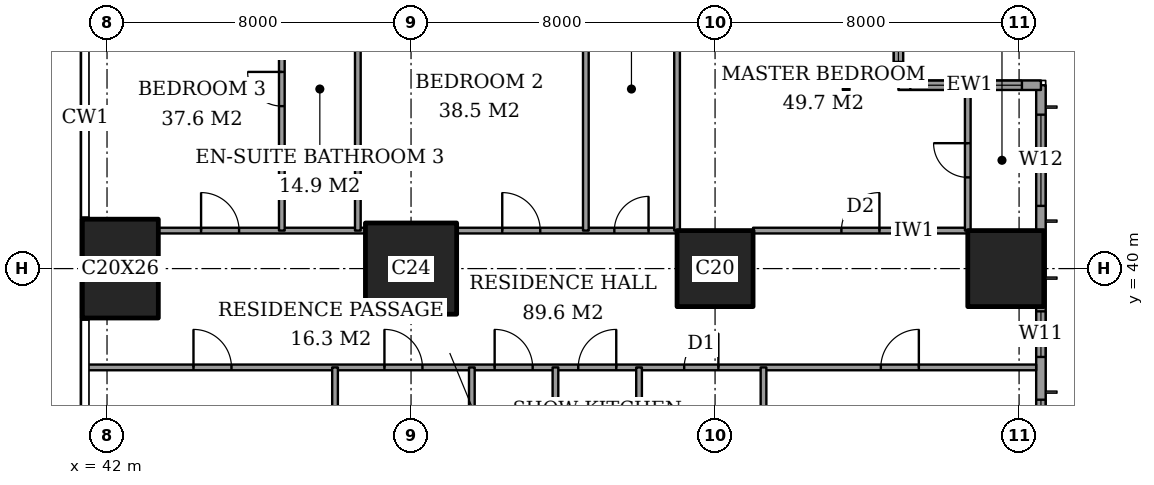
"""IFC4 building model, lengths in metres.
Left out: names, types, materials, properties, quantities, classifications, styles, units other than length and angle.
Written with IfcOpenShell. Run it as: python <this file> out.ifc"""

import sys

from ifc_helpers import new_model, si_unit, direction, frame, frame_2d, origin, origin_2d, place, context, subcontext, project, spatial, rectangle, extrude, element, fill, save


model = new_model("IFC4")
c1 = context("Model", 3, precision=1e-05, world=origin(), true_north=direction((0.0, 1.0)))
c2 = subcontext(c1, "Body", "Model", "MODEL_VIEW")
j1 = project(units=[si_unit("LENGTHUNIT", "METRE"), si_unit("PLANEANGLEUNIT", "RADIAN")], contexts=[c1])
p1 = place(None, origin())
s1 = spatial("IfcSite", under=j1, at=p1, CompositionType="ELEMENT")
p2 = place(p1, origin())
s2 = spatial("IfcBuilding", under=s1, at=p2, CompositionType="ELEMENT")
p3 = place(p2, frame((0.0, 0.0, 114.2)))
s3 = spatial("IfcBuildingStorey", under=s2, at=p3, CompositionType="ELEMENT", Elevation=114.2)
p4 = place(p3, frame((42.35, 40.0, 0.0), z_axis=(0.0, 0.0, 1.0), x_axis=(1.0, 0.0, 0.0)))
e1 = element("IfcColumn", 1, at=p4, inside=s3, PredefinedType="COLUMN", context=c2, shape_type="SweptSolid", body=[
    extrude(rectangle(XDim=2.0, YDim=2.6, at=origin_2d()), origin(), (0.0, 0.0, 1.0), 3.6),
])
p5 = place(p3, frame((50.0, 40.0, 0.0), z_axis=(0.0, 0.0, 1.0), x_axis=(1.0, 0.0, 0.0)))
e2 = element("IfcColumn", 2, at=p5, inside=s3, PredefinedType="COLUMN", context=c2, shape_type="SweptSolid", body=[
    extrude(rectangle(XDim=2.4, YDim=2.4, at=origin_2d()), origin(), (0.0, 0.0, 1.0), 3.6),
])
for number, where, z_axis, x_axis in (
    (3, (58.0, 40.0, 0.0), (0.0, 0.0, 1.0), (1.0, 0.0, 0.0)),
    (4, (65.65, 40.0, 0.0), (0.0, 0.0, 1.0), (1.0, 0.0, 0.0)),
):
    element("IfcColumn", number, at=place(p3, frame(where, z_axis=z_axis, x_axis=x_axis)), inside=s3, PredefinedType="COLUMN", context=c2, shape_type="SweptSolid", body=[
        extrude(rectangle(XDim=2.0, YDim=2.0, at=origin_2d()), origin(), (0.0, 0.0, 1.0), 3.6),
    ])
p6 = place(p3, frame((66.575, 3.175, 0.0), z_axis=(0.0, 0.0, 1.0), x_axis=(0.0, 1.0, 0.0)))
e5 = element("IfcWall", 5, at=p6, inside=s3, PredefinedType="SOLIDWALL", context=c2, shape_type="SweptSolid", body=[
    extrude(rectangle(XDim=41.65, YDim=0.25, at=frame_2d((20.825, 0.0))), origin(), (0.0, 0.0, 1.0), 3.6),
])
p7 = place(p6, frame((0.775, 0.0, 0.4)))
e6 = element("IfcOpeningElement", 6, at=p7, cuts=e5, PredefinedType="OPENING", context=c2, shape_type="SweptSolid", body=[
    extrude(rectangle(XDim=2.4, YDim=2.2, at=frame_2d((1.2, 1.1))), frame((0.0, 0.135, 0.0), z_axis=(0.0, -1.0, 0.0), x_axis=(1.0, 0.0, 0.0)), (0.0, 0.0, 1.0), 0.27),
])
p8 = place(p6, frame((6.1, 0.0, 0.4)))
e7 = element("IfcOpeningElement", 7, at=p8, cuts=e5, PredefinedType="OPENING", context=c2, shape_type="SweptSolid", body=[
    extrude(rectangle(XDim=1.2, YDim=2.2, at=frame_2d((0.6, 1.1))), frame((0.0, 0.135, 0.0), z_axis=(0.0, -1.0, 0.0), x_axis=(1.0, 0.0, 0.0)), (0.0, 0.0, 1.0), 0.27),
])
p9 = place(p6, frame((8.275, 0.0, 0.4)))
e8 = element("IfcOpeningElement", 8, at=p9, cuts=e5, PredefinedType="OPENING", context=c2, shape_type="SweptSolid", body=[
    extrude(rectangle(XDim=2.4, YDim=2.2, at=frame_2d((1.2, 1.1))), frame((0.0, 0.135, 0.0), z_axis=(0.0, -1.0, 0.0), x_axis=(1.0, 0.0, 0.0)), (0.0, 0.0, 1.0), 0.27),
])
p10 = place(p6, frame((15.775, 0.0, 0.4)))
e9 = element("IfcOpeningElement", 9, at=p10, cuts=e5, PredefinedType="OPENING", context=c2, shape_type="SweptSolid", body=[
    extrude(rectangle(XDim=2.4, YDim=2.2, at=frame_2d((1.2, 1.1))), frame((0.0, 0.135, 0.0), z_axis=(0.0, -1.0, 0.0), x_axis=(1.0, 0.0, 0.0)), (0.0, 0.0, 1.0), 0.27),
])
p11 = place(p6, frame((23.475, 0.0, 0.4)))
e10 = element("IfcOpeningElement", 10, at=p11, cuts=e5, PredefinedType="OPENING", context=c2, shape_type="SweptSolid", body=[
    extrude(rectangle(XDim=2.4, YDim=2.2, at=frame_2d((1.2, 1.1))), frame((0.0, 0.135, 0.0), z_axis=(0.0, -1.0, 0.0), x_axis=(1.0, 0.0, 0.0)), (0.0, 0.0, 1.0), 0.27),
])
p12 = place(p6, frame((30.975, 0.0, 0.4)))
e11 = element("IfcOpeningElement", 11, at=p12, cuts=e5, PredefinedType="OPENING", context=c2, shape_type="SweptSolid", body=[
    extrude(rectangle(XDim=2.4, YDim=2.2, at=frame_2d((1.2, 1.1))), frame((0.0, 0.135, 0.0), z_axis=(0.0, -1.0, 0.0), x_axis=(1.0, 0.0, 0.0)), (0.0, 0.0, 1.0), 0.27),
])
p13 = place(p6, frame((34.5, 0.0, 0.4)))
e12 = element("IfcOpeningElement", 12, at=p13, cuts=e5, PredefinedType="OPENING", context=c2, shape_type="SweptSolid", body=[
    extrude(rectangle(XDim=1.2, YDim=2.2, at=frame_2d((0.6, 1.1))), frame((0.0, 0.135, 0.0), z_axis=(0.0, -1.0, 0.0), x_axis=(1.0, 0.0, 0.0)), (0.0, 0.0, 1.0), 0.27),
])
p14 = place(p6, frame((38.475, 0.0, 0.4)))
e13 = element("IfcOpeningElement", 13, at=p14, cuts=e5, PredefinedType="OPENING", context=c2, shape_type="SweptSolid", body=[
    extrude(rectangle(XDim=2.4, YDim=2.2, at=frame_2d((1.2, 1.1))), frame((0.0, 0.135, 0.0), z_axis=(0.0, -1.0, 0.0), x_axis=(1.0, 0.0, 0.0)), (0.0, 0.0, 1.0), 0.27),
])
p15 = place(p3, frame((66.575, 44.825, 0.0), z_axis=(0.0, 0.0, 1.0), x_axis=(-1.0, 0.0, 0.0)))
e14 = element("IfcWall", 14, at=p15, inside=s3, PredefinedType="SOLIDWALL", context=c2, shape_type="SweptSolid", body=[
    extrude(rectangle(XDim=3.75, YDim=0.25, at=frame_2d((1.875, 0.0))), origin(), (0.0, 0.0, 1.0), 3.6),
])
p16 = place(p15, frame((0.5, 0.0, 0.4)))
e15 = element("IfcOpeningElement", 15, at=p16, cuts=e14, PredefinedType="OPENING", context=c2, shape_type="SweptSolid", body=[
    extrude(rectangle(XDim=1.2, YDim=2.2, at=frame_2d((0.6, 1.1))), frame((0.0, 0.135, 0.0), z_axis=(0.0, -1.0, 0.0), x_axis=(1.0, 0.0, 0.0)), (0.0, 0.0, 1.0), 0.27),
])
p17 = place(p15, frame((2.238, 0.0, 0.4)))
e16 = element("IfcOpeningElement", 16, at=p17, cuts=e14, PredefinedType="OPENING", context=c2, shape_type="SweptSolid", body=[
    extrude(rectangle(XDim=1.2, YDim=2.2, at=frame_2d((0.6, 1.1))), frame((0.0, 0.135, 0.0), z_axis=(0.0, -1.0, 0.0), x_axis=(1.0, 0.0, 0.0)), (0.0, 0.0, 1.0), 0.27),
])
p18 = place(p3, frame((62.825, 44.825, 0.0), z_axis=(0.0, 0.0, 1.0), x_axis=(0.0, 1.0, 0.0)))
e17 = element("IfcWall", 17, at=p18, inside=s3, PredefinedType="SOLIDWALL", context=c2, shape_type="SweptSolid", body=[
    extrude(rectangle(XDim=3.75, YDim=0.25, at=frame_2d((1.875, 0.0))), origin(), (0.0, 0.0, 1.0), 3.6),
])
p19 = place(p18, frame((0.613, 0.0, 0.4)))
e18 = element("IfcOpeningElement", 18, at=p19, cuts=e17, PredefinedType="OPENING", context=c2, shape_type="SweptSolid", body=[
    extrude(rectangle(XDim=2.4, YDim=2.2, at=frame_2d((1.2, 1.1))), frame((0.0, 0.135, 0.0), z_axis=(0.0, -1.0, 0.0), x_axis=(1.0, 0.0, 0.0)), (0.0, 0.0, 1.0), 0.27),
])
p20 = place(p3, frame((41.439, 37.4, 0.0), z_axis=(0.0, 0.0, 1.0), x_axis=(1.0, 0.0, 0.0)))
e19 = element("IfcWall", 19, at=p20, inside=s3, PredefinedType="PARTITIONING", context=c2, shape_type="SweptSolid", body=[
    extrude(rectangle(XDim=25.011, YDim=0.15, at=frame_2d((12.505, 0.0))), origin(), (0.0, 0.0, 1.0), 3.35),
])
p21 = place(p20, frame((10.761, 0.0, 0.0)))
e20 = element("IfcOpeningElement", 20, at=p21, cuts=e19, PredefinedType="OPENING", context=c2, shape_type="SweptSolid", body=[
    extrude(rectangle(XDim=1.0, YDim=2.1, at=frame_2d((0.5, 1.05))), frame((0.0, 0.085, 0.0), z_axis=(0.0, -1.0, 0.0), x_axis=(1.0, 0.0, 0.0)), (0.0, 0.0, 1.0), 0.17),
])
p22 = place(p20, frame((20.924, 0.0, 0.0)))
e21 = element("IfcOpeningElement", 21, at=p22, cuts=e19, PredefinedType="OPENING", context=c2, shape_type="SweptSolid", body=[
    extrude(rectangle(XDim=1.0, YDim=2.1, at=frame_2d((0.5, 1.05))), frame((0.0, 0.085, 0.0), z_axis=(0.0, -1.0, 0.0), x_axis=(1.0, 0.0, 0.0)), (0.0, 0.0, 1.0), 0.17),
])
p23 = place(p20, frame((15.749, 0.0, 0.0)))
e22 = element("IfcOpeningElement", 22, at=p23, cuts=e19, PredefinedType="OPENING", context=c2, shape_type="SweptSolid", body=[
    extrude(rectangle(XDim=0.9, YDim=2.1, at=frame_2d((0.45, 1.05))), frame((0.0, 0.085, 0.0), z_axis=(0.0, -1.0, 0.0), x_axis=(1.0, 0.0, 0.0)), (0.0, 0.0, 1.0), 0.17),
])
p24 = place(p20, frame((12.961, 0.0, 0.0)))
e23 = element("IfcOpeningElement", 23, at=p24, cuts=e19, PredefinedType="OPENING", context=c2, shape_type="SweptSolid", body=[
    extrude(rectangle(XDim=1.0, YDim=2.1, at=frame_2d((0.5, 1.05))), frame((0.0, 0.085, 0.0), z_axis=(0.0, -1.0, 0.0), x_axis=(1.0, 0.0, 0.0)), (0.0, 0.0, 1.0), 0.17),
])
p25 = place(p20, frame((7.861, 0.0, 0.0)))
e24 = element("IfcOpeningElement", 24, at=p25, cuts=e19, PredefinedType="OPENING", context=c2, shape_type="SweptSolid", body=[
    extrude(rectangle(XDim=1.0, YDim=2.1, at=frame_2d((0.5, 1.05))), frame((0.0, 0.085, 0.0), z_axis=(0.0, -1.0, 0.0), x_axis=(1.0, 0.0, 0.0)), (0.0, 0.0, 1.0), 0.17),
])
p26 = place(p20, frame((2.836, 0.0, 0.0)))
e25 = element("IfcOpeningElement", 25, at=p26, cuts=e19, PredefinedType="OPENING", context=c2, shape_type="SweptSolid", body=[
    extrude(rectangle(XDim=1.0, YDim=2.1, at=frame_2d((0.5, 1.05))), frame((0.0, 0.085, 0.0), z_axis=(0.0, -1.0, 0.0), x_axis=(1.0, 0.0, 0.0)), (0.0, 0.0, 1.0), 0.17),
])
p27 = place(p3, frame((43.35, 41.0, 0.0), z_axis=(0.0, 0.0, 1.0), x_axis=(1.0, 0.0, 0.0)))
e26 = element("IfcWall", 26, at=p27, inside=s3, PredefinedType="PARTITIONING", context=c2, shape_type="SweptSolid", body=[
    extrude(rectangle(XDim=5.45, YDim=0.15, at=frame_2d((2.725, 0.0))), origin(), (0.0, 0.0, 1.0), 3.35),
])
p28 = place(p27, frame((1.125, 0.0, 0.0)))
e27 = element("IfcOpeningElement", 27, at=p28, cuts=e26, PredefinedType="OPENING", context=c2, shape_type="SweptSolid", body=[
    extrude(rectangle(XDim=1.0, YDim=2.1, at=frame_2d((0.5, 1.05))), frame((0.0, 0.085, 0.0), z_axis=(0.0, -1.0, 0.0), x_axis=(1.0, 0.0, 0.0)), (0.0, 0.0, 1.0), 0.17),
])
p29 = place(p3, frame((51.2, 41.0, 0.0), z_axis=(0.0, 0.0, 1.0), x_axis=(1.0, 0.0, 0.0)))
e28 = element("IfcWall", 28, at=p29, inside=s3, PredefinedType="PARTITIONING", context=c2, shape_type="SweptSolid", body=[
    extrude(rectangle(XDim=5.8, YDim=0.15, at=frame_2d((2.9, 0.0))), origin(), (0.0, 0.0, 1.0), 3.35),
])
p30 = place(p29, frame((4.15, 0.0, 0.0)))
e29 = element("IfcOpeningElement", 29, at=p30, cuts=e28, PredefinedType="OPENING", context=c2, shape_type="SweptSolid", body=[
    extrude(rectangle(XDim=0.9, YDim=2.1, at=frame_2d((0.45, 1.05))), frame((0.0, 0.085, 0.0), z_axis=(0.0, -1.0, 0.0), x_axis=(1.0, 0.0, 0.0)), (0.0, 0.0, 1.0), 0.17),
])
p31 = place(p29, frame((1.2, 0.0, 0.0)))
e30 = element("IfcOpeningElement", 30, at=p31, cuts=e28, PredefinedType="OPENING", context=c2, shape_type="SweptSolid", body=[
    extrude(rectangle(XDim=1.0, YDim=2.1, at=frame_2d((0.5, 1.05))), frame((0.0, 0.085, 0.0), z_axis=(0.0, -1.0, 0.0), x_axis=(1.0, 0.0, 0.0)), (0.0, 0.0, 1.0), 0.17),
])
p32 = place(p3, frame((59.0, 41.0, 0.0), z_axis=(0.0, 0.0, 1.0), x_axis=(1.0, 0.0, 0.0)))
e31 = element("IfcWall", 31, at=p32, inside=s3, PredefinedType="PARTITIONING", context=c2, shape_type="SweptSolid", body=[
    extrude(rectangle(XDim=5.65, YDim=0.15, at=frame_2d((2.825, 0.0))), origin(), (0.0, 0.0, 1.0), 3.35),
])
p33 = place(p32, frame((2.325, 0.0, 0.0)))
e32 = element("IfcOpeningElement", 32, at=p33, cuts=e31, PredefinedType="OPENING", context=c2, shape_type="SweptSolid", body=[
    extrude(rectangle(XDim=1.0, YDim=2.1, at=frame_2d((0.5, 1.05))), frame((0.0, 0.085, 0.0), z_axis=(0.0, -1.0, 0.0), x_axis=(1.0, 0.0, 0.0)), (0.0, 0.0, 1.0), 0.17),
])
p34 = place(p3, frame((46.6, 41.0, 0.0), z_axis=(0.0, 0.0, 1.0), x_axis=(0.0, 1.0, 0.0)))
e33 = element("IfcWall", 33, at=p34, inside=s3, PredefinedType="PARTITIONING", context=c2, shape_type="SweptSolid", body=[
    extrude(rectangle(XDim=7.45, YDim=0.15, at=frame_2d((3.725, 0.0))), origin(), (0.0, 0.0, 1.0), 3.35),
])
p35 = place(p34, frame((3.275, 0.0, 0.0)))
e34 = element("IfcOpeningElement", 34, at=p35, cuts=e33, PredefinedType="OPENING", context=c2, shape_type="SweptSolid", body=[
    extrude(rectangle(XDim=0.9, YDim=2.1, at=frame_2d((0.45, 1.05))), frame((0.0, 0.085, 0.0), z_axis=(0.0, -1.0, 0.0), x_axis=(1.0, 0.0, 0.0)), (0.0, 0.0, 1.0), 0.17),
])
p36 = place(p3, frame((48.0, 28.0, 0.0), z_axis=(0.0, 0.0, 1.0), x_axis=(0.0, 1.0, 0.0)))
e35 = element("IfcWall", 35, at=p36, inside=s3, PredefinedType="PARTITIONING", context=c2, shape_type="SweptSolid", body=[
    extrude(rectangle(XDim=9.4, YDim=0.15, at=frame_2d((4.7, 0.0))), origin(), (0.0, 0.0, 1.0), 3.35),
])
p37 = place(p36, frame((0.55, 0.0, 0.0)))
e36 = element("IfcOpeningElement", 36, at=p37, cuts=e35, PredefinedType="OPENING", context=c2, shape_type="SweptSolid", body=[
    extrude(rectangle(XDim=0.9, YDim=2.1, at=frame_2d((0.45, 1.05))), frame((0.0, 0.085, 0.0), z_axis=(0.0, -1.0, 0.0), x_axis=(1.0, 0.0, 0.0)), (0.0, 0.0, 1.0), 0.17),
])
p38 = place(p3, frame((48.6, 41.0, 0.0), z_axis=(0.0, 0.0, 1.0), x_axis=(0.0, 1.0, 0.0)))
e37 = element("IfcWall", 37, at=p38, inside=s3, PredefinedType="PARTITIONING", context=c2, shape_type="SweptSolid", body=[
    extrude(rectangle(XDim=7.45, YDim=0.15, at=frame_2d((3.725, 0.0))), origin(), (0.0, 0.0, 1.0), 3.35),
])
for number, where, z_axis, x_axis in (
    (38, (51.6, 30.0, 0.0), (0.0, 0.0, 1.0), (0.0, 1.0, 0.0)),
    (39, (53.8, 30.0, 0.0), (0.0, 0.0, 1.0), (0.0, 1.0, 0.0)),
):
    element("IfcWall", number, at=place(p3, frame(where, z_axis=z_axis, x_axis=x_axis)), inside=s3, PredefinedType="PARTITIONING", context=c2, shape_type="SweptSolid", body=[
        extrude(rectangle(XDim=7.4, YDim=0.15, at=frame_2d((3.7, 0.0))), origin(), (0.0, 0.0, 1.0), 3.35),
    ])
p39 = place(p3, frame((54.6, 41.0, 0.0), z_axis=(0.0, 0.0, 1.0), x_axis=(0.0, 1.0, 0.0)))
e40 = element("IfcWall", 40, at=p39, inside=s3, PredefinedType="PARTITIONING", context=c2, shape_type="SweptSolid", body=[
    extrude(rectangle(XDim=7.45, YDim=0.15, at=frame_2d((3.725, 0.0))), origin(), (0.0, 0.0, 1.0), 3.35),
])
p40 = place(p3, frame((56.0, 28.0, 0.0), z_axis=(0.0, 0.0, 1.0), x_axis=(0.0, 1.0, 0.0)))
e41 = element("IfcWall", 41, at=p40, inside=s3, PredefinedType="PARTITIONING", context=c2, shape_type="SweptSolid", body=[
    extrude(rectangle(XDim=9.4, YDim=0.15, at=frame_2d((4.7, 0.0))), origin(), (0.0, 0.0, 1.0), 3.35),
])
p41 = place(p40, frame((0.5, 0.0, 0.0)))
e42 = element("IfcOpeningElement", 42, at=p41, cuts=e41, PredefinedType="OPENING", context=c2, shape_type="SweptSolid", body=[
    extrude(rectangle(XDim=1.0, YDim=2.1, at=frame_2d((0.5, 1.05))), frame((0.0, 0.085, 0.0), z_axis=(0.0, -1.0, 0.0), x_axis=(1.0, 0.0, 0.0)), (0.0, 0.0, 1.0), 0.17),
])
p42 = place(p3, frame((57.0, 41.0, 0.0), z_axis=(0.0, 0.0, 1.0), x_axis=(0.0, 1.0, 0.0)))
e43 = element("IfcWall", 43, at=p42, inside=s3, PredefinedType="PARTITIONING", context=c2, shape_type="SweptSolid", body=[
    extrude(rectangle(XDim=5.65, YDim=0.15, at=frame_2d((2.825, 0.0))), origin(), (0.0, 0.0, 1.0), 3.35),
])
p43 = place(p3, frame((59.275, 33.2, 0.0), z_axis=(0.0, 0.0, 1.0), x_axis=(0.0, 1.0, 0.0)))
e44 = element("IfcWall", 44, at=p43, inside=s3, PredefinedType="PARTITIONING", context=c2, shape_type="SweptSolid", body=[
    extrude(rectangle(XDim=4.2, YDim=0.15, at=frame_2d((2.1, 0.0))), origin(), (0.0, 0.0, 1.0), 3.35),
])
p44 = place(p3, frame((64.65, 41.0, 0.0), z_axis=(0.0, 0.0, 1.0), x_axis=(0.0, 1.0, 0.0)))
e45 = element("IfcWall", 45, at=p44, inside=s3, PredefinedType="PARTITIONING", context=c2, shape_type="SweptSolid", body=[
    extrude(rectangle(XDim=3.7, YDim=0.15, at=frame_2d((1.85, 0.0))), origin(), (0.0, 0.0, 1.0), 3.35),
])
p45 = place(p44, frame((1.4, 0.0, 0.0)))
e46 = element("IfcOpeningElement", 46, at=p45, cuts=e45, PredefinedType="OPENING", context=c2, shape_type="SweptSolid", body=[
    extrude(rectangle(XDim=0.9, YDim=2.1, at=frame_2d((0.45, 1.05))), frame((0.0, 0.085, 0.0), z_axis=(0.0, -1.0, 0.0), x_axis=(1.0, 0.0, 0.0)), (0.0, 0.0, 1.0), 0.17),
])
p46 = place(p12, origin())
e47 = element("IfcWindow", 47, at=p46, inside=s3, PartitioningType="SINGLE_PANEL", PredefinedType="WINDOW", context=c2, shape_type="SweptSolid", body=[
    extrude(rectangle(XDim=2.4, YDim=2.2, at=frame_2d((1.2, 1.1))), frame((0.0, 0.03, 0.0), z_axis=(0.0, -1.0, 0.0), x_axis=(1.0, 0.0, 0.0)), (0.0, 0.0, 1.0), 0.06),
])
fill(e11, e47)
p47 = place(p13, origin())
e48 = element("IfcWindow", 48, at=p47, inside=s3, PartitioningType="SINGLE_PANEL", PredefinedType="WINDOW", context=c2, shape_type="SweptSolid", body=[
    extrude(rectangle(XDim=1.2, YDim=2.2, at=frame_2d((0.6, 1.1))), frame((0.0, 0.03, 0.0), z_axis=(0.0, -1.0, 0.0), x_axis=(1.0, 0.0, 0.0)), (0.0, 0.0, 1.0), 0.06),
])
fill(e12, e48)
p48 = place(p14, origin())
e49 = element("IfcWindow", 49, at=p48, inside=s3, PartitioningType="SINGLE_PANEL", PredefinedType="WINDOW", context=c2, shape_type="SweptSolid", body=[
    extrude(rectangle(XDim=2.4, YDim=2.2, at=frame_2d((1.2, 1.1))), frame((0.0, 0.03, 0.0), z_axis=(0.0, -1.0, 0.0), x_axis=(1.0, 0.0, 0.0)), (0.0, 0.0, 1.0), 0.06),
])
fill(e13, e49)
p49 = place(p16, origin())
e50 = element("IfcWindow", 50, at=p49, inside=s3, PartitioningType="SINGLE_PANEL", PredefinedType="WINDOW", context=c2, shape_type="SweptSolid", body=[
    extrude(rectangle(XDim=1.2, YDim=2.2, at=frame_2d((0.6, 1.1))), frame((0.0, 0.03, 0.0), z_axis=(0.0, -1.0, 0.0), x_axis=(1.0, 0.0, 0.0)), (0.0, 0.0, 1.0), 0.06),
])
fill(e15, e50)
p50 = place(p17, origin())
e51 = element("IfcWindow", 51, at=p50, inside=s3, PartitioningType="SINGLE_PANEL", PredefinedType="WINDOW", context=c2, shape_type="SweptSolid", body=[
    extrude(rectangle(XDim=1.2, YDim=2.2, at=frame_2d((0.6, 1.1))), frame((0.0, 0.03, 0.0), z_axis=(0.0, -1.0, 0.0), x_axis=(1.0, 0.0, 0.0)), (0.0, 0.0, 1.0), 0.06),
])
fill(e16, e51)
p51 = place(p19, origin())
e52 = element("IfcWindow", 52, at=p51, inside=s3, PartitioningType="SINGLE_PANEL", PredefinedType="WINDOW", context=c2, shape_type="SweptSolid", body=[
    extrude(rectangle(XDim=2.4, YDim=2.2, at=frame_2d((1.2, 1.1))), frame((0.0, 0.03, 0.0), z_axis=(0.0, -1.0, 0.0), x_axis=(1.0, 0.0, 0.0)), (0.0, 0.0, 1.0), 0.06),
])
fill(e18, e52)
p52 = place(p45, origin())
e53 = element("IfcDoor", 53, at=p52, inside=s3, OperationType="SINGLE_SWING_LEFT", PredefinedType="DOOR", context=c2, shape_type="SweptSolid", body=[
    extrude(rectangle(XDim=0.9, YDim=2.1, at=frame_2d((0.45, 1.05))), frame((0.0, 0.025, 0.0), z_axis=(0.0, -1.0, 0.0), x_axis=(1.0, 0.0, 0.0)), (0.0, 0.0, 1.0), 0.05),
])
fill(e46, e53)
p53 = place(p33, origin())
e54 = element("IfcDoor", 54, at=p53, inside=s3, OperationType="SINGLE_SWING_LEFT", PredefinedType="DOOR", context=c2, shape_type="SweptSolid", body=[
    extrude(rectangle(XDim=1.0, YDim=2.1, at=frame_2d((0.5, 1.05))), frame((0.0, 0.025, 0.0), z_axis=(0.0, -1.0, 0.0), x_axis=(1.0, 0.0, 0.0)), (0.0, 0.0, 1.0), 0.05),
])
fill(e32, e54)
p54 = place(p30, origin())
e55 = element("IfcDoor", 55, at=p54, inside=s3, OperationType="SINGLE_SWING_LEFT", PredefinedType="DOOR", context=c2, shape_type="SweptSolid", body=[
    extrude(rectangle(XDim=0.9, YDim=2.1, at=frame_2d((0.45, 1.05))), frame((0.0, 0.025, 0.0), z_axis=(0.0, -1.0, 0.0), x_axis=(1.0, 0.0, 0.0)), (0.0, 0.0, 1.0), 0.05),
])
fill(e29, e55)
p55 = place(p31, origin())
e56 = element("IfcDoor", 56, at=p55, inside=s3, OperationType="SINGLE_SWING_RIGHT", PredefinedType="DOOR", context=c2, shape_type="SweptSolid", body=[
    extrude(rectangle(XDim=1.0, YDim=2.1, at=frame_2d((0.5, 1.05))), frame((0.0, 0.025, 0.0), z_axis=(0.0, -1.0, 0.0), x_axis=(1.0, 0.0, 0.0)), (0.0, 0.0, 1.0), 0.05),
])
fill(e30, e56)
p56 = place(p35, origin())
e57 = element("IfcDoor", 57, at=p56, inside=s3, OperationType="SINGLE_SWING_LEFT", PredefinedType="DOOR", context=c2, shape_type="SweptSolid", body=[
    extrude(rectangle(XDim=0.9, YDim=2.1, at=frame_2d((0.45, 1.05))), frame((0.0, 0.025, 0.0), z_axis=(0.0, -1.0, 0.0), x_axis=(1.0, 0.0, 0.0)), (0.0, 0.0, 1.0), 0.05),
])
fill(e34, e57)
p57 = place(p28, origin())
e58 = element("IfcDoor", 58, at=p57, inside=s3, OperationType="SINGLE_SWING_RIGHT", PredefinedType="DOOR", context=c2, shape_type="SweptSolid", body=[
    extrude(rectangle(XDim=1.0, YDim=2.1, at=frame_2d((0.5, 1.05))), frame((0.0, 0.025, 0.0), z_axis=(0.0, -1.0, 0.0), x_axis=(1.0, 0.0, 0.0)), (0.0, 0.0, 1.0), 0.05),
])
fill(e27, e58)
p58 = place(p21, origin())
e59 = element("IfcDoor", 59, at=p58, inside=s3, OperationType="SINGLE_SWING_RIGHT", PredefinedType="DOOR", context=c2, shape_type="SweptSolid", body=[
    extrude(rectangle(XDim=1.0, YDim=2.1, at=frame_2d((0.5, 1.05))), frame((0.0, 0.025, 0.0), z_axis=(0.0, -1.0, 0.0), x_axis=(1.0, 0.0, 0.0)), (0.0, 0.0, 1.0), 0.05),
])
fill(e20, e59)
p59 = place(p22, origin())
e60 = element("IfcDoor", 60, at=p59, inside=s3, OperationType="SINGLE_SWING_LEFT", PredefinedType="DOOR", context=c2, shape_type="SweptSolid", body=[
    extrude(rectangle(XDim=1.0, YDim=2.1, at=frame_2d((0.5, 1.05))), frame((0.0, 0.025, 0.0), z_axis=(0.0, -1.0, 0.0), x_axis=(1.0, 0.0, 0.0)), (0.0, 0.0, 1.0), 0.05),
])
fill(e21, e60)
p60 = place(p23, origin())
e61 = element("IfcDoor", 61, at=p60, inside=s3, OperationType="SINGLE_SWING_LEFT", PredefinedType="DOOR", context=c2, shape_type="SweptSolid", body=[
    extrude(rectangle(XDim=0.9, YDim=2.1, at=frame_2d((0.45, 1.05))), frame((0.0, 0.025, 0.0), z_axis=(0.0, -1.0, 0.0), x_axis=(1.0, 0.0, 0.0)), (0.0, 0.0, 1.0), 0.05),
])
fill(e22, e61)
p61 = place(p24, origin())
e62 = element("IfcDoor", 62, at=p61, inside=s3, OperationType="SINGLE_SWING_LEFT", PredefinedType="DOOR", context=c2, shape_type="SweptSolid", body=[
    extrude(rectangle(XDim=1.0, YDim=2.1, at=frame_2d((0.5, 1.05))), frame((0.0, 0.025, 0.0), z_axis=(0.0, -1.0, 0.0), x_axis=(1.0, 0.0, 0.0)), (0.0, 0.0, 1.0), 0.05),
])
fill(e23, e62)
p62 = place(p25, origin())
e63 = element("IfcDoor", 63, at=p62, inside=s3, OperationType="SINGLE_SWING_RIGHT", PredefinedType="DOOR", context=c2, shape_type="SweptSolid", body=[
    extrude(rectangle(XDim=1.0, YDim=2.1, at=frame_2d((0.5, 1.05))), frame((0.0, 0.025, 0.0), z_axis=(0.0, -1.0, 0.0), x_axis=(1.0, 0.0, 0.0)), (0.0, 0.0, 1.0), 0.05),
])
fill(e24, e63)
p63 = place(p26, origin())
e64 = element("IfcDoor", 64, at=p63, inside=s3, OperationType="SINGLE_SWING_RIGHT", PredefinedType="DOOR", context=c2, shape_type="SweptSolid", body=[
    extrude(rectangle(XDim=1.0, YDim=2.1, at=frame_2d((0.5, 1.05))), frame((0.0, 0.025, 0.0), z_axis=(0.0, -1.0, 0.0), x_axis=(1.0, 0.0, 0.0)), (0.0, 0.0, 1.0), 0.05),
])
fill(e25, e64)
save(model, sys.argv[1])
